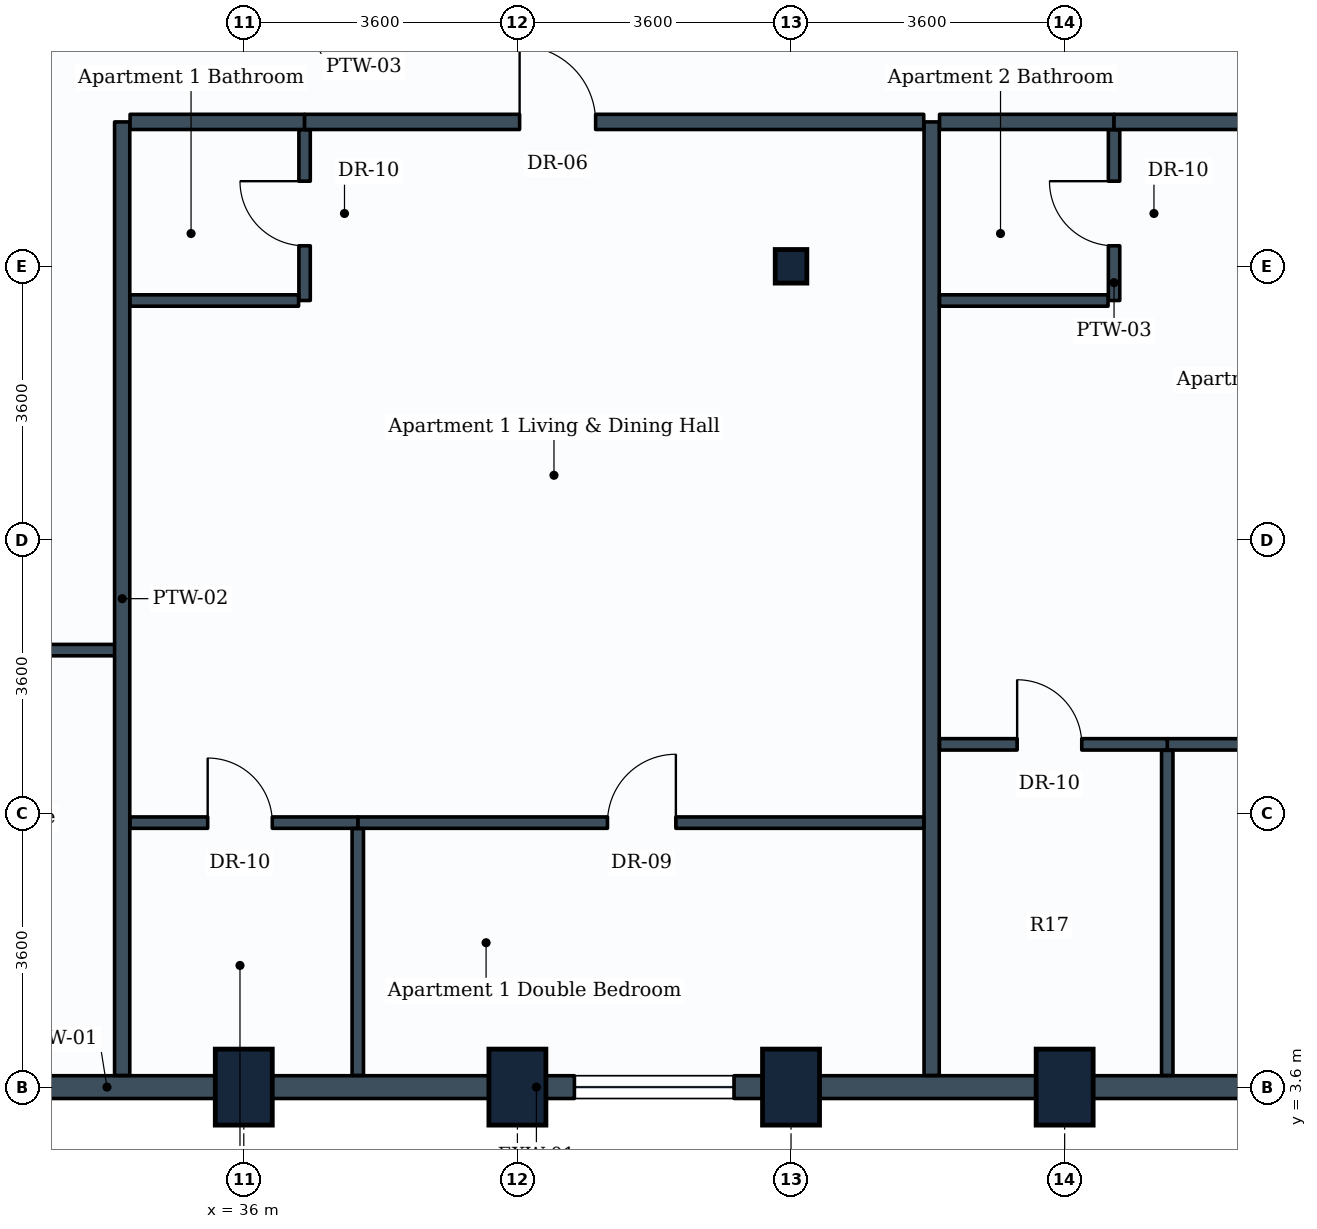
"""IFC4 building model, lengths in metres.
Left out: names, types, materials, properties, quantities, classifications, styles, units other than length and angle.
Written with IfcOpenShell. Run it as: python <this file> out.ifc"""

import sys

from ifc_helpers import new_model, si_unit, direction, frame, frame_2d, origin, origin_2d, place, context, subcontext, project, spatial, rectangle, i_section, extrude, element, fill, save


model = new_model("IFC4")
c1 = context("Model", 3, precision=1e-05, world=origin(), true_north=direction((0.0, 1.0)))
c2 = subcontext(c1, "Body", "Model", "MODEL_VIEW")
j1 = project(units=[si_unit("LENGTHUNIT", "METRE"), si_unit("PLANEANGLEUNIT", "RADIAN")], contexts=[c1])
p1 = place(None, origin())
s1 = spatial("IfcSite", under=j1, at=p1, CompositionType="ELEMENT")
p2 = place(p1, origin())
s2 = spatial("IfcBuilding", under=s1, at=p2, CompositionType="ELEMENT")
p3 = place(p2, frame((0.0, 0.0, 154.2)))
s3 = spatial("IfcBuildingStorey", under=s2, at=p3, CompositionType="ELEMENT", Elevation=154.2)
for number, where, z_axis, x_axis in (
    (1, (36.0, 3.6, 0.0), (0.0, 0.0, 1.0), (1.0, 0.0, 0.0)),
    (2, (39.6, 3.6, 0.0), (0.0, 0.0, 1.0), (1.0, 0.0, 0.0)),
    (3, (43.2, 3.6, 0.0), (0.0, 0.0, 1.0), (1.0, 0.0, 0.0)),
):
    element("IfcColumn", number, at=place(p3, frame(where, z_axis=z_axis, x_axis=x_axis)), inside=s3, PredefinedType="COLUMN", context=c2, shape_type="SweptSolid", body=[
        extrude(rectangle(XDim=0.75, YDim=1.0, at=origin_2d()), origin(), (0.0, 0.0, 1.0), 3.8),
    ])
p4 = place(p3, frame((43.2, 14.4, 0.0), z_axis=(0.0, 0.0, 1.0), x_axis=(1.0, 0.0, 0.0)))
e4 = element("IfcColumn", 4, at=p4, inside=s3, PredefinedType="COLUMN", context=c2, shape_type="SweptSolid", body=[
    extrude(i_section(OverallWidth=0.416, OverallDepth=0.442, WebThickness=0.025, FlangeThickness=0.041, FilletRadius=0.015, at=origin_2d()), origin(), (0.0, 0.0, 1.0), 3.8),
])
p5 = place(p3, frame((46.8, 3.6, 0.0), z_axis=(0.0, 0.0, 1.0), x_axis=(1.0, 0.0, 0.0)))
e5 = element("IfcColumn", 5, at=p5, inside=s3, PredefinedType="COLUMN", context=c2, shape_type="SweptSolid", body=[
    extrude(rectangle(XDim=0.75, YDim=1.0, at=origin_2d()), origin(), (0.0, 0.0, 1.0), 3.8),
])
for number, where, z_axis, x_axis in (
    (6, (36.0, 3.6, 0.0), (0.0, 0.0, 1.0), (-1.0, 0.0, 0.0)),
    (7, (39.6, 3.6, 0.0), (0.0, 0.0, 1.0), (-1.0, 0.0, 0.0)),
):
    element("IfcWall", number, at=place(p3, frame(where, z_axis=z_axis, x_axis=x_axis)), inside=s3, PredefinedType="STANDARD", context=c2, shape_type="SweptSolid", body=[
        extrude(rectangle(XDim=3.6, YDim=0.3, at=frame_2d((1.8, 0.0))), origin(), (0.0, 0.0, 1.0), 2.93),
    ])
p6 = place(p3, frame((43.2, 3.6, 0.0), z_axis=(0.0, 0.0, 1.0), x_axis=(-1.0, 0.0, 0.0)))
e8 = element("IfcWall", 8, at=p6, inside=s3, PredefinedType="STANDARD", context=c2, shape_type="SweptSolid", body=[
    extrude(rectangle(XDim=3.6, YDim=0.3, at=frame_2d((1.8, 0.0))), origin(), (0.0, 0.0, 1.0), 2.93),
])
p7 = place(p6, frame((0.75, 0.0, 0.85)))
e9 = element("IfcOpeningElement", 9, at=p7, cuts=e8, PredefinedType="OPENING", context=c2, shape_type="SweptSolid", body=[
    extrude(rectangle(XDim=2.1, YDim=1.35, at=frame_2d((1.05, 0.675))), frame((0.0, 0.16, 0.0), z_axis=(0.0, -1.0, 0.0), x_axis=(1.0, 0.0, 0.0)), (0.0, 0.0, 1.0), 0.32),
])
p8 = place(p3, frame((46.8, 3.6, 0.0), z_axis=(0.0, 0.0, 1.0), x_axis=(-1.0, 0.0, 0.0)))
e10 = element("IfcWall", 10, at=p8, inside=s3, PredefinedType="STANDARD", context=c2, shape_type="SweptSolid", body=[
    extrude(rectangle(XDim=3.6, YDim=0.3, at=frame_2d((1.8, 0.0))), origin(), (0.0, 0.0, 1.0), 2.93),
])
p9 = place(p3, frame((50.4, 3.6, 0.0), z_axis=(0.0, 0.0, 1.0), x_axis=(-1.0, 0.0, 0.0)))
e11 = element("IfcWall", 11, at=p9, inside=s3, PredefinedType="STANDARD", context=c2, shape_type="SweptSolid", body=[
    extrude(rectangle(XDim=3.6, YDim=0.3, at=frame_2d((1.8, 0.0))), origin(), (0.0, 0.0, 1.0), 2.93),
])
p10 = place(p3, frame((28.879, 9.35, 0.0), z_axis=(0.0, 0.0, 1.0), x_axis=(1.0, 0.0, 0.0)))
e12 = element("IfcWall", 12, at=p10, inside=s3, PredefinedType="PARTITIONING", context=c2, shape_type="SweptSolid", body=[
    extrude(rectangle(XDim=5.521, YDim=0.15, at=frame_2d((2.76, 0.0))), origin(), (0.0, 0.0, 1.0), 3.535),
])
p11 = place(p10, frame((0.36, 0.0, 0.0)))
e13 = element("IfcOpeningElement", 13, at=p11, cuts=e12, PredefinedType="OPENING", context=c2, shape_type="SweptSolid", body=[
    extrude(rectangle(XDim=1.0, YDim=2.1, at=frame_2d((0.5, 1.05))), frame((0.0, 0.085, 0.0), z_axis=(0.0, -1.0, 0.0), x_axis=(1.0, 0.0, 0.0)), (0.0, 0.0, 1.0), 0.17),
])
for number, where, z_axis, x_axis in (
    (14, (34.4, 3.754, 0.0), (0.0, 0.0, 1.0), (0.0, 1.0, 0.0)),
    (15, (45.05, 3.754, 0.0), (0.0, 0.0, 1.0), (0.0, 1.0, 0.0)),
):
    element("IfcWall", number, at=place(p3, frame(where, z_axis=z_axis, x_axis=x_axis)), inside=s3, PredefinedType="PARTITIONING", context=c2, shape_type="SweptSolid", body=[
        extrude(rectangle(XDim=12.546, YDim=0.2, at=frame_2d((6.273, 0.0))), origin(), (0.0, 0.0, 1.0), 2.93),
    ])
p12 = place(p3, frame((34.504, 16.3, 0.0), z_axis=(0.0, 0.0, 1.0), x_axis=(1.0, 0.0, 0.0)))
e16 = element("IfcWall", 16, at=p12, inside=s3, PredefinedType="PARTITIONING", context=c2, shape_type="SweptSolid", body=[
    extrude(rectangle(XDim=2.296, YDim=0.2, at=frame_2d((1.148, 0.0))), origin(), (0.0, 0.0, 1.0), 3.22),
])
p13 = place(p3, frame((36.8, 13.95, 0.0), z_axis=(0.0, 0.0, 1.0), x_axis=(0.0, 1.0, 0.0)))
e17 = element("IfcWall", 17, at=p13, inside=s3, PredefinedType="PARTITIONING", context=c2, shape_type="SweptSolid", body=[
    extrude(rectangle(XDim=2.246, YDim=0.15, at=frame_2d((1.123, 0.0))), origin(), (0.0, 0.0, 1.0), 3.17),
])
p14 = place(p13, frame((0.72, 0.0, 0.0)))
e18 = element("IfcOpeningElement", 18, at=p14, cuts=e17, PredefinedType="OPENING", context=c2, shape_type="SweptSolid", body=[
    extrude(rectangle(XDim=0.85, YDim=2.1, at=frame_2d((0.425, 1.05))), frame((0.0, 0.085, 0.0), z_axis=(0.0, -1.0, 0.0), x_axis=(1.0, 0.0, 0.0)), (0.0, 0.0, 1.0), 0.17),
])
p15 = place(p3, frame((34.504, 13.95, 0.0), z_axis=(0.0, 0.0, 1.0), x_axis=(1.0, 0.0, 0.0)))
e19 = element("IfcWall", 19, at=p15, inside=s3, PredefinedType="PARTITIONING", context=c2, shape_type="SweptSolid", body=[
    extrude(rectangle(XDim=2.217, YDim=0.15, at=frame_2d((1.108, 0.0))), origin(), (0.0, 0.0, 1.0), 3.22),
])
p16 = place(p3, frame((36.8, 16.3, 0.0), z_axis=(0.0, 0.0, 1.0), x_axis=(1.0, 0.0, 0.0)))
e20 = element("IfcWall", 20, at=p16, inside=s3, PredefinedType="PARTITIONING", context=c2, shape_type="SweptSolid", body=[
    extrude(rectangle(XDim=8.146, YDim=0.2, at=frame_2d((4.073, 0.0))), origin(), (0.0, 0.0, 1.0), 3.17),
])
p17 = place(p16, frame((2.829, 0.0, 0.0)))
e21 = element("IfcOpeningElement", 21, at=p17, cuts=e20, PredefinedType="OPENING", context=c2, shape_type="SweptSolid", body=[
    extrude(rectangle(XDim=1.0, YDim=2.1, at=frame_2d((0.5, 1.05))), frame((0.0, 0.11, 0.0), z_axis=(0.0, -1.0, 0.0), x_axis=(1.0, 0.0, 0.0)), (0.0, 0.0, 1.0), 0.22),
])
p18 = place(p3, frame((37.5, 7.08, 0.0), z_axis=(0.0, 0.0, 1.0), x_axis=(1.0, 0.0, 0.0)))
e22 = element("IfcWall", 22, at=p18, inside=s3, PredefinedType="PARTITIONING", context=c2, shape_type="SweptSolid", body=[
    extrude(rectangle(XDim=7.446, YDim=0.15, at=frame_2d((3.723, 0.0))), origin(), (0.0, 0.0, 1.0), 3.17),
])
p19 = place(p18, frame((3.285, 0.0, 0.0)))
e23 = element("IfcOpeningElement", 23, at=p19, cuts=e22, PredefinedType="OPENING", context=c2, shape_type="SweptSolid", body=[
    extrude(rectangle(XDim=0.9, YDim=2.1, at=frame_2d((0.45, 1.05))), frame((0.0, 0.085, 0.0), z_axis=(0.0, -1.0, 0.0), x_axis=(1.0, 0.0, 0.0)), (0.0, 0.0, 1.0), 0.17),
])
p20 = place(p3, frame((34.504, 7.08, 0.0), z_axis=(0.0, 0.0, 1.0), x_axis=(1.0, 0.0, 0.0)))
e24 = element("IfcWall", 24, at=p20, inside=s3, PredefinedType="PARTITIONING", context=c2, shape_type="SweptSolid", body=[
    extrude(rectangle(XDim=2.996, YDim=0.15, at=frame_2d((1.498, 0.0))), origin(), (0.0, 0.0, 1.0), 3.17),
])
p21 = place(p20, frame((1.021, 0.0, 0.0)))
e25 = element("IfcOpeningElement", 25, at=p21, cuts=e24, PredefinedType="OPENING", context=c2, shape_type="SweptSolid", body=[
    extrude(rectangle(XDim=0.85, YDim=2.1, at=frame_2d((0.425, 1.05))), frame((0.0, 0.085, 0.0), z_axis=(0.0, -1.0, 0.0), x_axis=(1.0, 0.0, 0.0)), (0.0, 0.0, 1.0), 0.17),
])
p22 = place(p3, frame((37.5, 3.754, 0.0), z_axis=(0.0, 0.0, 1.0), x_axis=(0.0, 1.0, 0.0)))
e26 = element("IfcWall", 26, at=p22, inside=s3, PredefinedType="PARTITIONING", context=c2, shape_type="SweptSolid", body=[
    extrude(rectangle(XDim=3.247, YDim=0.15, at=frame_2d((1.624, 0.0))), origin(), (0.0, 0.0, 1.0), 2.93),
])
p23 = place(p3, frame((45.154, 16.3, 0.0), z_axis=(0.0, 0.0, 1.0), x_axis=(1.0, 0.0, 0.0)))
e27 = element("IfcWall", 27, at=p23, inside=s3, PredefinedType="PARTITIONING", context=c2, shape_type="SweptSolid", body=[
    extrude(rectangle(XDim=2.296, YDim=0.2, at=frame_2d((1.148, 0.0))), origin(), (0.0, 0.0, 1.0), 3.17),
])
p24 = place(p3, frame((47.45, 13.95, 0.0), z_axis=(0.0, 0.0, 1.0), x_axis=(0.0, 1.0, 0.0)))
e28 = element("IfcWall", 28, at=p24, inside=s3, PredefinedType="PARTITIONING", context=c2, shape_type="SweptSolid", body=[
    extrude(rectangle(XDim=2.246, YDim=0.15, at=frame_2d((1.123, 0.0))), origin(), (0.0, 0.0, 1.0), 3.17),
])
p25 = place(p24, frame((0.72, 0.0, 0.0)))
e29 = element("IfcOpeningElement", 29, at=p25, cuts=e28, PredefinedType="OPENING", context=c2, shape_type="SweptSolid", body=[
    extrude(rectangle(XDim=0.85, YDim=2.1, at=frame_2d((0.425, 1.05))), frame((0.0, 0.085, 0.0), z_axis=(0.0, -1.0, 0.0), x_axis=(1.0, 0.0, 0.0)), (0.0, 0.0, 1.0), 0.17),
])
p26 = place(p3, frame((45.154, 13.95, 0.0), z_axis=(0.0, 0.0, 1.0), x_axis=(1.0, 0.0, 0.0)))
e30 = element("IfcWall", 30, at=p26, inside=s3, PredefinedType="PARTITIONING", context=c2, shape_type="SweptSolid", body=[
    extrude(rectangle(XDim=2.217, YDim=0.15, at=frame_2d((1.108, 0.0))), origin(), (0.0, 0.0, 1.0), 3.17),
])
p27 = place(p3, frame((47.45, 16.3, 0.0), z_axis=(0.0, 0.0, 1.0), x_axis=(1.0, 0.0, 0.0)))
e31 = element("IfcWall", 31, at=p27, inside=s3, PredefinedType="PARTITIONING", context=c2, shape_type="SweptSolid", body=[
    extrude(rectangle(XDim=6.396, YDim=0.2, at=frame_2d((3.198, 0.0))), origin(), (0.0, 0.0, 1.0), 2.93),
])
p28 = place(p27, frame((2.735, 0.0, 0.0)))
e32 = element("IfcOpeningElement", 32, at=p28, cuts=e31, PredefinedType="OPENING", context=c2, shape_type="SweptSolid", body=[
    extrude(rectangle(XDim=1.0, YDim=2.1, at=frame_2d((0.5, 1.05))), frame((0.0, 0.11, 0.0), z_axis=(0.0, -1.0, 0.0), x_axis=(1.0, 0.0, 0.0)), (0.0, 0.0, 1.0), 0.22),
])
p29 = place(p3, frame((48.15, 8.11, 0.0), z_axis=(0.0, 0.0, 1.0), x_axis=(1.0, 0.0, 0.0)))
e33 = element("IfcWall", 33, at=p29, inside=s3, PredefinedType="PARTITIONING", context=c2, shape_type="SweptSolid", body=[
    extrude(rectangle(XDim=5.696, YDim=0.15, at=frame_2d((2.848, 0.0))), origin(), (0.0, 0.0, 1.0), 2.93),
])
p30 = place(p29, frame((1.797, 0.0, 0.0)))
e34 = element("IfcOpeningElement", 34, at=p30, cuts=e33, PredefinedType="OPENING", context=c2, shape_type="SweptSolid", body=[
    extrude(rectangle(XDim=0.9, YDim=2.1, at=frame_2d((0.45, 1.05))), frame((0.0, 0.085, 0.0), z_axis=(0.0, -1.0, 0.0), x_axis=(1.0, 0.0, 0.0)), (0.0, 0.0, 1.0), 0.17),
])
p31 = place(p3, frame((45.154, 8.11, 0.0), z_axis=(0.0, 0.0, 1.0), x_axis=(1.0, 0.0, 0.0)))
e35 = element("IfcWall", 35, at=p31, inside=s3, PredefinedType="PARTITIONING", context=c2, shape_type="SweptSolid", body=[
    extrude(rectangle(XDim=2.996, YDim=0.15, at=frame_2d((1.498, 0.0))), origin(), (0.0, 0.0, 1.0), 3.17),
])
p32 = place(p31, frame((1.021, 0.0, 0.0)))
e36 = element("IfcOpeningElement", 36, at=p32, cuts=e35, PredefinedType="OPENING", context=c2, shape_type="SweptSolid", body=[
    extrude(rectangle(XDim=0.85, YDim=2.1, at=frame_2d((0.425, 1.05))), frame((0.0, 0.085, 0.0), z_axis=(0.0, -1.0, 0.0), x_axis=(1.0, 0.0, 0.0)), (0.0, 0.0, 1.0), 0.17),
])
p33 = place(p3, frame((48.15, 3.754, 0.0), z_axis=(0.0, 0.0, 1.0), x_axis=(0.0, 1.0, 0.0)))
e37 = element("IfcWall", 37, at=p33, inside=s3, PredefinedType="PARTITIONING", context=c2, shape_type="SweptSolid", body=[
    extrude(rectangle(XDim=4.277, YDim=0.15, at=frame_2d((2.139, 0.0))), origin(), (0.0, 0.0, 1.0), 2.93),
])
p34 = place(p7, origin())
e38 = element("IfcWindow", 38, at=p34, inside=s3, PartitioningType="SINGLE_PANEL", PredefinedType="WINDOW", context=c2, shape_type="SweptSolid", body=[
    extrude(rectangle(XDim=2.1, YDim=1.35, at=frame_2d((1.05, 0.675))), frame((0.0, 0.03, 0.0), z_axis=(0.0, -1.0, 0.0), x_axis=(1.0, 0.0, 0.0)), (0.0, 0.0, 1.0), 0.06),
])
fill(e9, e38)
p35 = place(p14, origin())
e39 = element("IfcDoor", 39, at=p35, inside=s3, OperationType="SINGLE_SWING_RIGHT", PredefinedType="DOOR", context=c2, shape_type="SweptSolid", body=[
    extrude(rectangle(XDim=0.85, YDim=2.1, at=frame_2d((0.425, 1.05))), frame((0.0, 0.025, 0.0), z_axis=(0.0, -1.0, 0.0), x_axis=(1.0, 0.0, 0.0)), (0.0, 0.0, 1.0), 0.05),
])
fill(e18, e39)
p36 = place(p17, origin())
e40 = element("IfcDoor", 40, at=p36, inside=s3, OperationType="SINGLE_SWING_LEFT", PredefinedType="DOOR", context=c2, shape_type="SweptSolid", body=[
    extrude(rectangle(XDim=1.0, YDim=2.1, at=frame_2d((0.5, 1.05))), frame((0.0, 0.025, 0.0), z_axis=(0.0, -1.0, 0.0), x_axis=(1.0, 0.0, 0.0)), (0.0, 0.0, 1.0), 0.05),
])
fill(e21, e40)
p37 = place(p19, origin())
e41 = element("IfcDoor", 41, at=p37, inside=s3, OperationType="SINGLE_SWING_RIGHT", PredefinedType="DOOR", context=c2, shape_type="SweptSolid", body=[
    extrude(rectangle(XDim=0.9, YDim=2.1, at=frame_2d((0.45, 1.05))), frame((0.0, 0.025, 0.0), z_axis=(0.0, -1.0, 0.0), x_axis=(1.0, 0.0, 0.0)), (0.0, 0.0, 1.0), 0.05),
])
fill(e23, e41)
p38 = place(p21, origin())
e42 = element("IfcDoor", 42, at=p38, inside=s3, OperationType="SINGLE_SWING_LEFT", PredefinedType="DOOR", context=c2, shape_type="SweptSolid", body=[
    extrude(rectangle(XDim=0.85, YDim=2.1, at=frame_2d((0.425, 1.05))), frame((0.0, 0.025, 0.0), z_axis=(0.0, -1.0, 0.0), x_axis=(1.0, 0.0, 0.0)), (0.0, 0.0, 1.0), 0.05),
])
fill(e25, e42)
p39 = place(p25, origin())
e43 = element("IfcDoor", 43, at=p39, inside=s3, OperationType="SINGLE_SWING_RIGHT", PredefinedType="DOOR", context=c2, shape_type="SweptSolid", body=[
    extrude(rectangle(XDim=0.85, YDim=2.1, at=frame_2d((0.425, 1.05))), frame((0.0, 0.025, 0.0), z_axis=(0.0, -1.0, 0.0), x_axis=(1.0, 0.0, 0.0)), (0.0, 0.0, 1.0), 0.05),
])
fill(e29, e43)
p40 = place(p32, origin())
e44 = element("IfcDoor", 44, at=p40, inside=s3, OperationType="SINGLE_SWING_LEFT", PredefinedType="DOOR", context=c2, shape_type="SweptSolid", body=[
    extrude(rectangle(XDim=0.85, YDim=2.1, at=frame_2d((0.425, 1.05))), frame((0.0, 0.025, 0.0), z_axis=(0.0, -1.0, 0.0), x_axis=(1.0, 0.0, 0.0)), (0.0, 0.0, 1.0), 0.05),
])
fill(e36, e44)
save(model, sys.argv[1])
